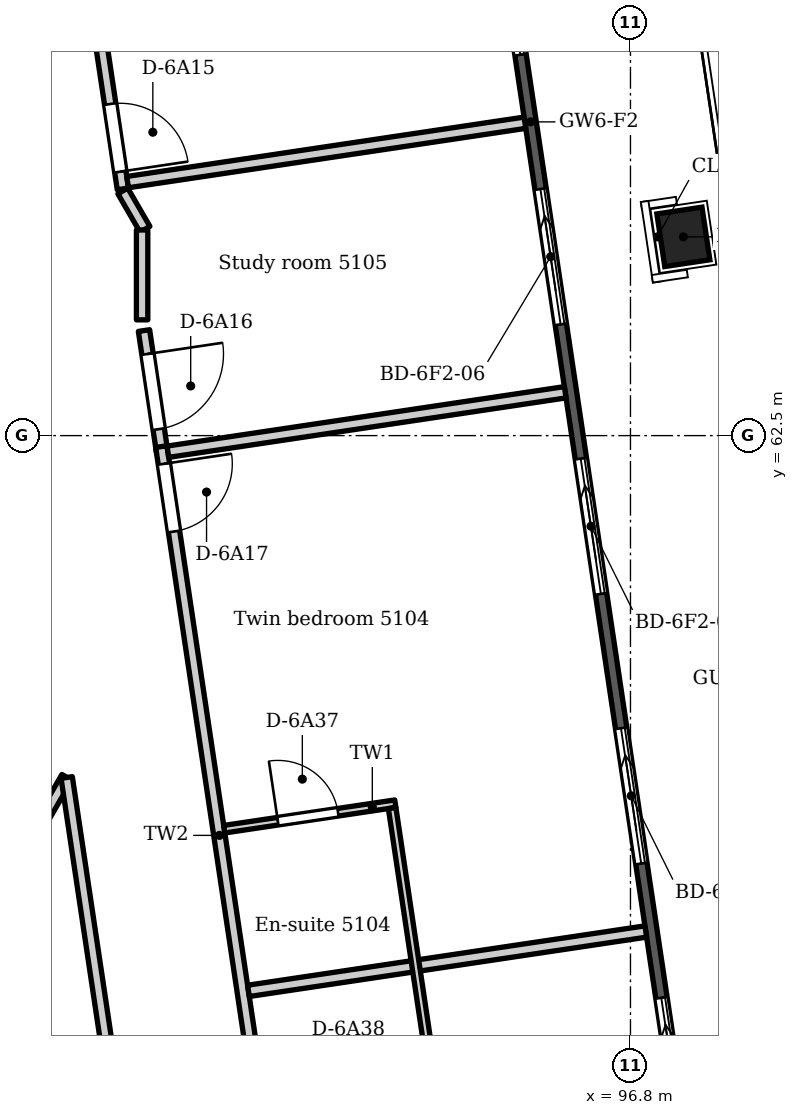
"""IFC4 building model, lengths in metres.
Left out: names, types, materials, properties, quantities, classifications, styles, units other than length and angle.
Written with IfcOpenShell. Run it as: python <this file> out.ifc"""

import sys

from ifc_helpers import new_model, si_unit, direction, frame, frame_2d, origin, origin_2d, place, context, subcontext, project, spatial, polyline, rectangle, outline, extrude, element, fill, save


model = new_model("IFC4")
c1 = context("Model", 3, precision=1e-05, world=origin(), true_north=direction((0.0, 1.0)))
c2 = subcontext(c1, "Body", "Model", "MODEL_VIEW")
j1 = project(units=[si_unit("LENGTHUNIT", "METRE"), si_unit("PLANEANGLEUNIT", "RADIAN")], contexts=[c1])
p1 = place(None, origin())
s1 = spatial("IfcSite", under=j1, at=p1, CompositionType="ELEMENT")
p2 = place(p1, origin())
s2 = spatial("IfcBuilding", under=s1, at=p2, CompositionType="ELEMENT")
p3 = place(p2, frame((0.0, 0.0, 198.0)))
s3 = spatial("IfcBuildingStorey", under=s2, at=p3, CompositionType="ELEMENT", Elevation=198.0)
p4 = place(p3, frame((97.496, 65.115, -0.35), z_axis=(0.0, 0.0, 1.0), x_axis=(-0.14780941113, 0.989015863362, 0.0)))
e1 = element("IfcColumn", 1, at=p4, inside=s3, PredefinedType="COLUMN", context=c2, shape_type="SweptSolid", body=[
    extrude(rectangle(XDim=0.7, YDim=0.6, at=origin_2d()), origin(), (0.0, 0.0, 1.0), 3.95),
])
p5 = place(p3, frame((92.835, 84.36, 0.0), z_axis=(0.0, 0.0, 1.0), x_axis=(0.147810490781, -0.989015702006, 0.0)))
e2 = element("IfcWall", 2, at=p5, inside=s3, PredefinedType="SOLIDWALL", context=c2, shape_type="SweptSolid", body=[
    extrude(outline(polyline([(0.149, 0.075), (0.149, -0.075), (39.297, -0.075), (39.297, 0.075), (0.149, 0.075)])), origin(), (0.0, 0.0, 1.0), 3.3),
])
p6 = place(p5, frame((1.193, 0.0, 0.0)))
e3 = element("IfcOpeningElement", 3, at=p6, cuts=e2, PredefinedType="OPENING", context=c2, shape_type="SweptSolid", body=[
    extrude(rectangle(XDim=1.8, YDim=2.6, at=frame_2d((0.9, 1.3))), frame((0.0, 0.085, 0.0), z_axis=(0.0, -1.0, 0.0), x_axis=(1.0, 0.0, 0.0)), (0.0, 0.0, 1.0), 0.17),
])
p7 = place(p5, frame((4.479, 0.0, 0.0)))
e4 = element("IfcOpeningElement", 4, at=p7, cuts=e2, PredefinedType="OPENING", context=c2, shape_type="SweptSolid", body=[
    extrude(rectangle(XDim=1.8, YDim=2.6, at=frame_2d((0.9, 1.3))), frame((0.0, 0.085, 0.0), z_axis=(0.0, -1.0, 0.0), x_axis=(1.0, 0.0, 0.0)), (0.0, 0.0, 1.0), 0.17),
])
p8 = place(p5, frame((8.065, 0.0, 0.0)))
e5 = element("IfcOpeningElement", 5, at=p8, cuts=e2, PredefinedType="OPENING", context=c2, shape_type="SweptSolid", body=[
    extrude(rectangle(XDim=1.8, YDim=2.6, at=frame_2d((0.9, 1.3))), frame((0.0, 0.085, 0.0), z_axis=(0.0, -1.0, 0.0), x_axis=(1.0, 0.0, 0.0)), (0.0, 0.0, 1.0), 0.17),
])
p9 = place(p5, frame((11.651, 0.0, 0.0)))
e6 = element("IfcOpeningElement", 6, at=p9, cuts=e2, PredefinedType="OPENING", context=c2, shape_type="SweptSolid", body=[
    extrude(rectangle(XDim=1.8, YDim=2.6, at=frame_2d((0.9, 1.3))), frame((0.0, 0.085, 0.0), z_axis=(0.0, -1.0, 0.0), x_axis=(1.0, 0.0, 0.0)), (0.0, 0.0, 1.0), 0.17),
])
p10 = place(p5, frame((15.237, 0.0, 0.0)))
e7 = element("IfcOpeningElement", 7, at=p10, cuts=e2, PredefinedType="OPENING", context=c2, shape_type="SweptSolid", body=[
    extrude(rectangle(XDim=1.8, YDim=2.6, at=frame_2d((0.9, 1.3))), frame((0.0, 0.085, 0.0), z_axis=(0.0, -1.0, 0.0), x_axis=(1.0, 0.0, 0.0)), (0.0, 0.0, 1.0), 0.17),
])
p11 = place(p5, frame((18.823, 0.0, 0.0)))
e8 = element("IfcOpeningElement", 8, at=p11, cuts=e2, PredefinedType="OPENING", context=c2, shape_type="SweptSolid", body=[
    extrude(rectangle(XDim=1.8, YDim=2.6, at=frame_2d((0.9, 1.3))), frame((0.0, 0.085, 0.0), z_axis=(0.0, -1.0, 0.0), x_axis=(1.0, 0.0, 0.0)), (0.0, 0.0, 1.0), 0.17),
])
p12 = place(p5, frame((22.409, 0.0, 0.0)))
e9 = element("IfcOpeningElement", 9, at=p12, cuts=e2, PredefinedType="OPENING", context=c2, shape_type="SweptSolid", body=[
    extrude(rectangle(XDim=1.8, YDim=2.6, at=frame_2d((0.9, 1.3))), frame((0.0, 0.085, 0.0), z_axis=(0.0, -1.0, 0.0), x_axis=(1.0, 0.0, 0.0)), (0.0, 0.0, 1.0), 0.17),
])
p13 = place(p5, frame((25.995, 0.0, 0.0)))
e10 = element("IfcOpeningElement", 10, at=p13, cuts=e2, PredefinedType="OPENING", context=c2, shape_type="SweptSolid", body=[
    extrude(rectangle(XDim=1.8, YDim=2.6, at=frame_2d((0.9, 1.3))), frame((0.0, 0.085, 0.0), z_axis=(0.0, -1.0, 0.0), x_axis=(1.0, 0.0, 0.0)), (0.0, 0.0, 1.0), 0.17),
])
p14 = place(p5, frame((29.581, 0.0, 0.0)))
e11 = element("IfcOpeningElement", 11, at=p14, cuts=e2, PredefinedType="OPENING", context=c2, shape_type="SweptSolid", body=[
    extrude(rectangle(XDim=1.8, YDim=2.6, at=frame_2d((0.9, 1.3))), frame((0.0, 0.085, 0.0), z_axis=(0.0, -1.0, 0.0), x_axis=(1.0, 0.0, 0.0)), (0.0, 0.0, 1.0), 0.17),
])
p15 = place(p5, frame((33.167, 0.0, 0.0)))
e12 = element("IfcOpeningElement", 12, at=p15, cuts=e2, PredefinedType="OPENING", context=c2, shape_type="SweptSolid", body=[
    extrude(rectangle(XDim=1.8, YDim=2.6, at=frame_2d((0.9, 1.3))), frame((0.0, 0.085, 0.0), z_axis=(0.0, -1.0, 0.0), x_axis=(1.0, 0.0, 0.0)), (0.0, 0.0, 1.0), 0.17),
])
p16 = place(p5, frame((36.453, 0.0, 0.0)))
e13 = element("IfcOpeningElement", 13, at=p16, cuts=e2, PredefinedType="OPENING", context=c2, shape_type="SweptSolid", body=[
    extrude(rectangle(XDim=1.8, YDim=2.6, at=frame_2d((0.9, 1.3))), frame((0.0, 0.085, 0.0), z_axis=(0.0, -1.0, 0.0), x_axis=(1.0, 0.0, 0.0)), (0.0, 0.0, 1.0), 0.17),
])
p17 = place(p3, frame((92.514, 40.454, 0.0), z_axis=(0.0, 0.0, 1.0), x_axis=(-0.930417922313, 0.3665003272, 0.0)))
e14 = element("IfcWall", 14, at=p17, inside=s3, PredefinedType="SOLIDWALL", context=c2, shape_type="SweptSolid", body=[
    extrude(outline(polyline([(0.149, 0.075), (0.149, -0.075), (39.297, -0.075), (39.297, 0.075), (0.149, 0.075)])), origin(), (0.0, 0.0, 1.0), 3.3),
])
p18 = place(p17, frame((1.193, 0.0, 0.0)))
e15 = element("IfcOpeningElement", 15, at=p18, cuts=e14, PredefinedType="OPENING", context=c2, shape_type="SweptSolid", body=[
    extrude(rectangle(XDim=1.8, YDim=2.6, at=frame_2d((0.9, 1.3))), frame((0.0, 0.085, 0.0), z_axis=(0.0, -1.0, 0.0), x_axis=(1.0, 0.0, 0.0)), (0.0, 0.0, 1.0), 0.17),
])
p19 = place(p17, frame((4.479, 0.0, 0.0)))
e16 = element("IfcOpeningElement", 16, at=p19, cuts=e14, PredefinedType="OPENING", context=c2, shape_type="SweptSolid", body=[
    extrude(rectangle(XDim=1.8, YDim=2.6, at=frame_2d((0.9, 1.3))), frame((0.0, 0.085, 0.0), z_axis=(0.0, -1.0, 0.0), x_axis=(1.0, 0.0, 0.0)), (0.0, 0.0, 1.0), 0.17),
])
p20 = place(p17, frame((8.065, 0.0, 0.0)))
e17 = element("IfcOpeningElement", 17, at=p20, cuts=e14, PredefinedType="OPENING", context=c2, shape_type="SweptSolid", body=[
    extrude(rectangle(XDim=1.8, YDim=2.6, at=frame_2d((0.9, 1.3))), frame((0.0, 0.085, 0.0), z_axis=(0.0, -1.0, 0.0), x_axis=(1.0, 0.0, 0.0)), (0.0, 0.0, 1.0), 0.17),
])
p21 = place(p17, frame((11.651, 0.0, 0.0)))
e18 = element("IfcOpeningElement", 18, at=p21, cuts=e14, PredefinedType="OPENING", context=c2, shape_type="SweptSolid", body=[
    extrude(rectangle(XDim=1.8, YDim=2.6, at=frame_2d((0.9, 1.3))), frame((0.0, 0.085, 0.0), z_axis=(0.0, -1.0, 0.0), x_axis=(1.0, 0.0, 0.0)), (0.0, 0.0, 1.0), 0.17),
])
p22 = place(p17, frame((15.237, 0.0, 0.0)))
e19 = element("IfcOpeningElement", 19, at=p22, cuts=e14, PredefinedType="OPENING", context=c2, shape_type="SweptSolid", body=[
    extrude(rectangle(XDim=1.8, YDim=2.6, at=frame_2d((0.9, 1.3))), frame((0.0, 0.085, 0.0), z_axis=(0.0, -1.0, 0.0), x_axis=(1.0, 0.0, 0.0)), (0.0, 0.0, 1.0), 0.17),
])
p23 = place(p17, frame((18.823, 0.0, 0.0)))
e20 = element("IfcOpeningElement", 20, at=p23, cuts=e14, PredefinedType="OPENING", context=c2, shape_type="SweptSolid", body=[
    extrude(rectangle(XDim=1.8, YDim=2.6, at=frame_2d((0.9, 1.3))), frame((0.0, 0.085, 0.0), z_axis=(0.0, -1.0, 0.0), x_axis=(1.0, 0.0, 0.0)), (0.0, 0.0, 1.0), 0.17),
])
p24 = place(p17, frame((22.409, 0.0, 0.0)))
e21 = element("IfcOpeningElement", 21, at=p24, cuts=e14, PredefinedType="OPENING", context=c2, shape_type="SweptSolid", body=[
    extrude(rectangle(XDim=1.8, YDim=2.6, at=frame_2d((0.9, 1.3))), frame((0.0, 0.085, 0.0), z_axis=(0.0, -1.0, 0.0), x_axis=(1.0, 0.0, 0.0)), (0.0, 0.0, 1.0), 0.17),
])
p25 = place(p17, frame((25.995, 0.0, 0.0)))
e22 = element("IfcOpeningElement", 22, at=p25, cuts=e14, PredefinedType="OPENING", context=c2, shape_type="SweptSolid", body=[
    extrude(rectangle(XDim=1.8, YDim=2.6, at=frame_2d((0.9, 1.3))), frame((0.0, 0.085, 0.0), z_axis=(0.0, -1.0, 0.0), x_axis=(1.0, 0.0, 0.0)), (0.0, 0.0, 1.0), 0.17),
])
p26 = place(p17, frame((29.581, 0.0, 0.0)))
e23 = element("IfcOpeningElement", 23, at=p26, cuts=e14, PredefinedType="OPENING", context=c2, shape_type="SweptSolid", body=[
    extrude(rectangle(XDim=1.8, YDim=2.6, at=frame_2d((0.9, 1.3))), frame((0.0, 0.085, 0.0), z_axis=(0.0, -1.0, 0.0), x_axis=(1.0, 0.0, 0.0)), (0.0, 0.0, 1.0), 0.17),
])
p27 = place(p17, frame((33.167, 0.0, 0.0)))
e24 = element("IfcOpeningElement", 24, at=p27, cuts=e14, PredefinedType="OPENING", context=c2, shape_type="SweptSolid", body=[
    extrude(rectangle(XDim=1.8, YDim=2.6, at=frame_2d((0.9, 1.3))), frame((0.0, 0.085, 0.0), z_axis=(0.0, -1.0, 0.0), x_axis=(1.0, 0.0, 0.0)), (0.0, 0.0, 1.0), 0.17),
])
p28 = place(p17, frame((36.453, 0.0, 0.0)))
e25 = element("IfcOpeningElement", 25, at=p28, cuts=e14, PredefinedType="OPENING", context=c2, shape_type="SweptSolid", body=[
    extrude(rectangle(XDim=1.8, YDim=2.6, at=frame_2d((0.9, 1.3))), frame((0.0, 0.085, 0.0), z_axis=(0.0, -1.0, 0.0), x_axis=(1.0, 0.0, 0.0)), (0.0, 0.0, 1.0), 0.17),
])
p29 = place(p3, frame((87.633, 54.97, 0.0), z_axis=(0.0, 0.0, 1.0), x_axis=(0.50005009493, 0.865996479531, 0.0)))
e26 = element("IfcWall", 26, at=p29, inside=s3, PredefinedType="PARTITIONING", context=c2, shape_type="SweptSolid", body=[
    extrude(rectangle(XDim=3.505, YDim=0.15, at=frame_2d((1.752, 0.0))), origin(), (0.0, 0.0, 1.0), 3.3),
])
p30 = place(p3, frame((89.367, 70.795, 0.0), z_axis=(0.0, 0.0, 1.0), x_axis=(0.147912499189, -0.989000451256, 0.0)))
e27 = element("IfcWall", 27, at=p30, inside=s3, PredefinedType="PARTITIONING", context=c2, shape_type="SweptSolid", body=[
    extrude(rectangle(XDim=5.105, YDim=0.15, at=frame_2d((2.553, 0.0))), origin(), (0.0, 0.0, 1.0), 3.3),
])
p31 = place(p30, frame((3.976, 0.0, 0.0)))
e28 = element("IfcOpeningElement", 28, at=p31, cuts=e27, PredefinedType="OPENING", context=c2, shape_type="SweptSolid", body=[
    extrude(rectangle(XDim=0.9, YDim=2.1, at=frame_2d((0.45, 1.05))), frame((0.0, 0.085, 0.0), z_axis=(0.0, -1.0, 0.0), x_axis=(1.0, 0.0, 0.0)), (0.0, 0.0, 1.0), 0.17),
])
p32 = place(p3, frame((89.383, 58.002, 0.0), z_axis=(0.0, 0.0, 1.0), x_axis=(0.14791043165, -0.989000760469, 0.0)))
e29 = element("IfcWall", 29, at=p32, inside=s3, PredefinedType="PARTITIONING", context=c2, shape_type="SweptSolid", body=[
    extrude(rectangle(XDim=3.859, YDim=0.15, at=frame_2d((1.93, 0.0))), origin(), (0.0, 0.0, 1.0), 3.3),
])
p33 = place(p3, frame((90.184, 65.835, 0.0), z_axis=(0.0, 0.0, 1.0), x_axis=(0.98902190879, 0.147768954566, 0.0)))
e30 = element("IfcWall", 30, at=p33, inside=s3, PredefinedType="PARTITIONING", context=c2, shape_type="SweptSolid", body=[
    extrude(rectangle(XDim=5.285, YDim=0.15, at=frame_2d((2.643, 0.0))), origin(), (0.0, 0.0, 1.0), 3.3),
])
p34 = place(p3, frame((90.121, 65.719, 0.0), z_axis=(0.0, 0.0, 1.0), x_axis=(0.500738673164, -0.865598510395, 0.0)))
e31 = element("IfcWall", 31, at=p34, inside=s3, PredefinedType="PARTITIONING", context=c2, shape_type="SweptSolid", body=[
    extrude(rectangle(XDim=0.582, YDim=0.15, at=frame_2d((0.291, 0.0))), origin(), (0.0, 0.0, 1.0), 3.3),
])
p35 = place(p3, frame((90.375, 64.023, 0.0), z_axis=(0.0, 0.0, 1.0), x_axis=(0.0, 1.0, 0.0)))
e32 = element("IfcWall", 32, at=p35, inside=s3, PredefinedType="PARTITIONING", context=c2, shape_type="SweptSolid", body=[
    extrude(rectangle(XDim=1.182, YDim=0.15, at=frame_2d((0.591, 0.0))), origin(), (0.0, 0.0, 1.0), 3.3),
])
p36 = place(p3, frame((90.4, 63.882, 0.0), z_axis=(0.0, 0.0, 1.0), x_axis=(0.147511205878, -0.989060384476, 0.0)))
e33 = element("IfcWall", 33, at=p36, inside=s3, PredefinedType="PARTITIONING", context=c2, shape_type="SweptSolid", body=[
    extrude(rectangle(XDim=1.627, YDim=0.15, at=frame_2d((0.813, 0.0))), origin(), (0.0, 0.0, 1.0), 3.3),
])
p37 = place(p36, frame((0.311, 0.0, 0.0)))
e34 = element("IfcOpeningElement", 34, at=p37, cuts=e33, PredefinedType="OPENING", context=c2, shape_type="SweptSolid", body=[
    extrude(rectangle(XDim=1.0, YDim=2.1, at=frame_2d((0.5, 1.05))), frame((0.0, 0.085, 0.0), z_axis=(0.0, -1.0, 0.0), x_axis=(1.0, 0.0, 0.0)), (0.0, 0.0, 1.0), 0.17),
])
p38 = place(p3, frame((90.628, 62.355, 0.0), z_axis=(0.0, 0.0, 1.0), x_axis=(0.147851766837, -0.989009532332, 0.0)))
e35 = element("IfcWall", 35, at=p38, inside=s3, PredefinedType="PARTITIONING", context=c2, shape_type="SweptSolid", body=[
    extrude(rectangle(XDim=9.064, YDim=0.15, at=frame_2d((4.532, 0.0))), origin(), (0.0, 0.0, 1.0), 3.3),
])
p39 = place(p38, frame((0.229, 0.0, 0.0)))
e36 = element("IfcOpeningElement", 36, at=p39, cuts=e35, PredefinedType="OPENING", context=c2, shape_type="SweptSolid", body=[
    extrude(rectangle(XDim=0.9, YDim=2.1, at=frame_2d((0.45, 1.05))), frame((0.0, 0.085, 0.0), z_axis=(0.0, -1.0, 0.0), x_axis=(1.0, 0.0, 0.0)), (0.0, 0.0, 1.0), 0.17),
])
p40 = place(p3, frame((90.714, 62.288, 0.0), z_axis=(0.0, 0.0, 1.0), x_axis=(0.988994889639, 0.147949681543, 0.0)))
e37 = element("IfcWall", 37, at=p40, inside=s3, PredefinedType="PARTITIONING", context=c2, shape_type="SweptSolid", body=[
    extrude(rectangle(XDim=5.285, YDim=0.15, at=frame_2d((2.643, 0.0))), origin(), (0.0, 0.0, 1.0), 3.3),
])
p41 = place(p3, frame((91.456, 57.322, 0.0), z_axis=(0.0, 0.0, 1.0), x_axis=(0.989070541656, 0.147443086062, 0.0)))
e38 = element("IfcWall", 38, at=p41, inside=s3, PredefinedType="PARTITIONING", context=c2, shape_type="SweptSolid", body=[
    extrude(rectangle(XDim=2.275, YDim=0.1, at=frame_2d((1.138, 0.0))), origin(), (0.0, 0.0, 1.0), 3.3),
])
p42 = place(p41, frame((0.713, 0.0, 0.0)))
e39 = element("IfcOpeningElement", 39, at=p42, cuts=e38, PredefinedType="OPENING", context=c2, shape_type="SweptSolid", body=[
    extrude(rectangle(XDim=0.8, YDim=2.1, at=frame_2d((0.4, 1.05))), frame((0.0, 0.06, 0.0), z_axis=(0.0, -1.0, 0.0), x_axis=(1.0, 0.0, 0.0)), (0.0, 0.0, 1.0), 0.12),
])
p43 = place(p3, frame((91.774, 55.195, 0.0), z_axis=(0.0, 0.0, 1.0), x_axis=(0.98902190879, 0.147768954566, 0.0)))
e40 = element("IfcWall", 40, at=p43, inside=s3, PredefinedType="PARTITIONING", context=c2, shape_type="SweptSolid", body=[
    extrude(rectangle(XDim=5.285, YDim=0.15, at=frame_2d((2.643, 0.0))), origin(), (0.0, 0.0, 1.0), 3.3),
])
p44 = place(p3, frame((93.664, 57.601, 0.0), z_axis=(0.0, 0.0, 1.0), x_axis=(0.147862783837, -0.989007885285, 0.0)))
e41 = element("IfcWall", 41, at=p44, inside=s3, PredefinedType="PARTITIONING", context=c2, shape_type="SweptSolid", body=[
    extrude(rectangle(XDim=3.999, YDim=0.1, at=frame_2d((2.0, 0.0))), origin(), (0.0, 0.0, 1.0), 3.3),
])
p45 = place(p10, origin())
e42 = element("IfcDoor", 42, at=p45, inside=s3, OperationType="SLIDING_TO_LEFT", PredefinedType="DOOR", context=c2, shape_type="SweptSolid", body=[
    extrude(rectangle(XDim=1.8, YDim=2.6, at=frame_2d((0.9, 1.3))), frame((0.0, 0.025, 0.0), z_axis=(0.0, -1.0, 0.0), x_axis=(1.0, 0.0, 0.0)), (0.0, 0.0, 1.0), 0.05),
])
fill(e7, e42)
p46 = place(p11, origin())
e43 = element("IfcDoor", 43, at=p46, inside=s3, OperationType="SLIDING_TO_LEFT", PredefinedType="DOOR", context=c2, shape_type="SweptSolid", body=[
    extrude(rectangle(XDim=1.8, YDim=2.6, at=frame_2d((0.9, 1.3))), frame((0.0, 0.025, 0.0), z_axis=(0.0, -1.0, 0.0), x_axis=(1.0, 0.0, 0.0)), (0.0, 0.0, 1.0), 0.05),
])
fill(e8, e43)
p47 = place(p12, origin())
e44 = element("IfcDoor", 44, at=p47, inside=s3, OperationType="SLIDING_TO_LEFT", PredefinedType="DOOR", context=c2, shape_type="SweptSolid", body=[
    extrude(rectangle(XDim=1.8, YDim=2.6, at=frame_2d((0.9, 1.3))), frame((0.0, 0.025, 0.0), z_axis=(0.0, -1.0, 0.0), x_axis=(1.0, 0.0, 0.0)), (0.0, 0.0, 1.0), 0.05),
])
fill(e9, e44)
p48 = place(p13, origin())
e45 = element("IfcDoor", 45, at=p48, inside=s3, OperationType="SLIDING_TO_LEFT", PredefinedType="DOOR", context=c2, shape_type="SweptSolid", body=[
    extrude(rectangle(XDim=1.8, YDim=2.6, at=frame_2d((0.9, 1.3))), frame((0.0, 0.025, 0.0), z_axis=(0.0, -1.0, 0.0), x_axis=(1.0, 0.0, 0.0)), (0.0, 0.0, 1.0), 0.05),
])
fill(e10, e45)
p49 = place(p14, origin())
e46 = element("IfcDoor", 46, at=p49, inside=s3, OperationType="SLIDING_TO_LEFT", PredefinedType="DOOR", context=c2, shape_type="SweptSolid", body=[
    extrude(rectangle(XDim=1.8, YDim=2.6, at=frame_2d((0.9, 1.3))), frame((0.0, 0.025, 0.0), z_axis=(0.0, -1.0, 0.0), x_axis=(1.0, 0.0, 0.0)), (0.0, 0.0, 1.0), 0.05),
])
fill(e11, e46)
p50 = place(p31, origin())
e47 = element("IfcDoor", 47, at=p50, inside=s3, OperationType="SINGLE_SWING_RIGHT", PredefinedType="DOOR", context=c2, shape_type="SweptSolid", body=[
    extrude(rectangle(XDim=0.9, YDim=2.1, at=frame_2d((0.45, 1.05))), frame((0.0, 0.025, 0.0), z_axis=(0.0, -1.0, 0.0), x_axis=(1.0, 0.0, 0.0)), (0.0, 0.0, 1.0), 0.05),
])
fill(e28, e47)
p51 = place(p37, origin())
e48 = element("IfcDoor", 48, at=p51, inside=s3, OperationType="SINGLE_SWING_LEFT", PredefinedType="DOOR", context=c2, shape_type="SweptSolid", body=[
    extrude(rectangle(XDim=1.0, YDim=2.1, at=frame_2d((0.5, 1.05))), frame((0.0, 0.025, 0.0), z_axis=(0.0, -1.0, 0.0), x_axis=(1.0, 0.0, 0.0)), (0.0, 0.0, 1.0), 0.05),
])
fill(e34, e48)
p52 = place(p39, origin())
e49 = element("IfcDoor", 49, at=p52, inside=s3, OperationType="SINGLE_SWING_LEFT", PredefinedType="DOOR", context=c2, shape_type="SweptSolid", body=[
    extrude(rectangle(XDim=0.9, YDim=2.1, at=frame_2d((0.45, 1.05))), frame((0.0, 0.025, 0.0), z_axis=(0.0, -1.0, 0.0), x_axis=(1.0, 0.0, 0.0)), (0.0, 0.0, 1.0), 0.05),
])
fill(e36, e49)
p53 = place(p42, origin())
e50 = element("IfcDoor", 50, at=p53, inside=s3, OperationType="SINGLE_SWING_LEFT", PredefinedType="DOOR", context=c2, shape_type="SweptSolid", body=[
    extrude(rectangle(XDim=0.8, YDim=2.1, at=frame_2d((0.4, 1.05))), frame((0.0, 0.025, 0.0), z_axis=(0.0, -1.0, 0.0), x_axis=(1.0, 0.0, 0.0)), (0.0, 0.0, 1.0), 0.05),
])
fill(e39, e50)
save(model, sys.argv[1])
